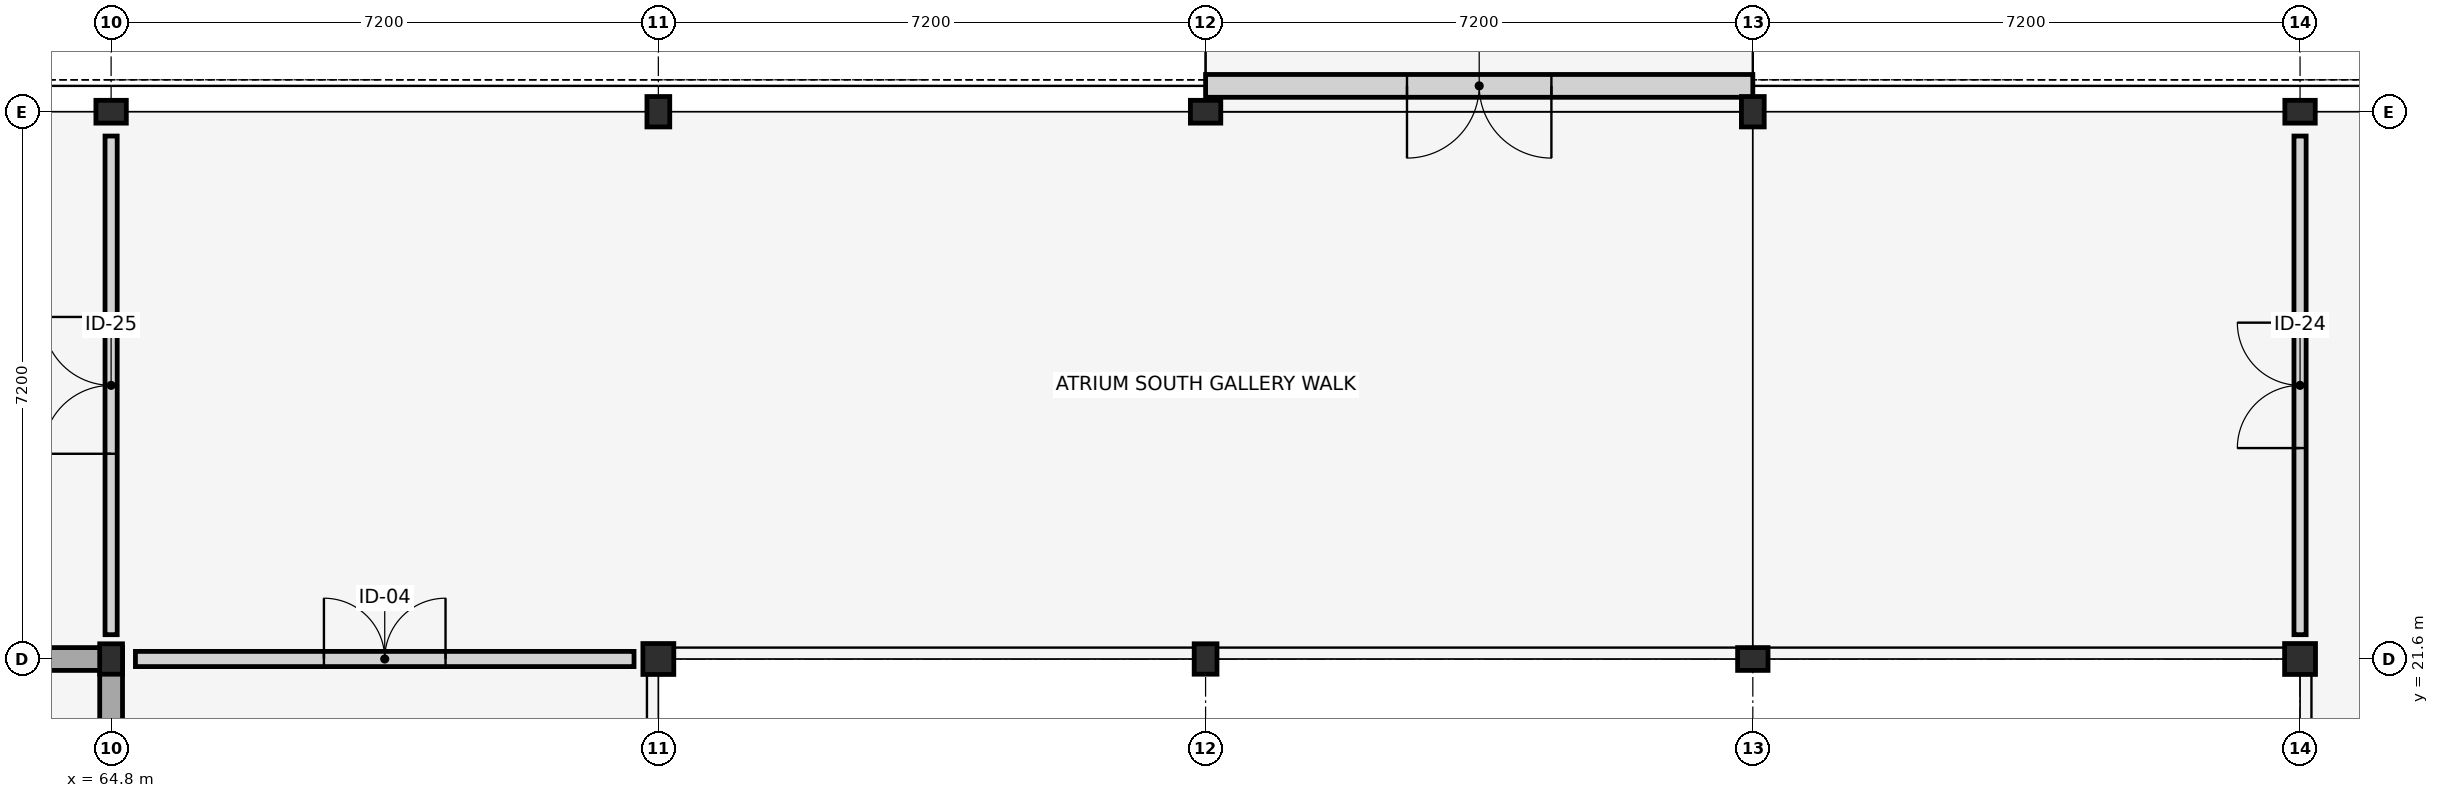
"""IFC4 building model, lengths in metres.
Left out: names, types, materials, properties, quantities, classifications, styles, units other than length and angle.
Written with IfcOpenShell. Run it as: python <this file> out.ifc"""

import sys

from ifc_helpers import new_model, si_unit, direction, frame, frame_2d, origin, origin_2d, place, context, subcontext, project, spatial, rectangle, hollow_circle, i_section, extrude, element, fill, save


model = new_model("IFC4")
c1 = context("Model", 3, precision=1e-05, world=origin(), true_north=direction((0.0, 1.0)))
c2 = subcontext(c1, "Body", "Model", "MODEL_VIEW")
j1 = project(units=[si_unit("LENGTHUNIT", "METRE"), si_unit("PLANEANGLEUNIT", "RADIAN")], contexts=[c1])
p1 = place(None, origin())
s1 = spatial("IfcSite", under=j1, at=p1, CompositionType="ELEMENT")
p2 = place(p1, origin())
s2 = spatial("IfcBuilding", under=s1, at=p2, CompositionType="ELEMENT")
p3 = place(p2, frame((0.0, 0.0, 4.5)))
s3 = spatial("IfcBuildingStorey", under=s2, at=p3, CompositionType="ELEMENT", Elevation=4.5)
for number, where, z_axis, x_axis in (
    (1, (64.8, 21.6, 0.0), (0.0, 0.0, 1.0), (1.0, 0.0, 0.0)),
    (2, (64.8, 28.8, 0.0), (0.0, 0.0, 1.0), (0.0, 1.0, 0.0)),
):
    element("IfcColumn", number, at=place(p3, frame(where, z_axis=z_axis, x_axis=x_axis)), inside=s3, PredefinedType="COLUMN", context=c2, shape_type="SweptSolid", body=[
        extrude(i_section(OverallWidth=0.3, OverallDepth=0.4, WebThickness=0.013, FlangeThickness=0.024, FilletRadius=0.027, at=origin_2d()), origin(), (0.0, 0.0, 1.0), 4.2),
    ])
p4 = place(p3, frame((72.0, 21.6, 0.0), z_axis=(0.0, 0.0, 1.0), x_axis=(0.0, 1.0, 0.0)))
e3 = element("IfcColumn", 3, at=p4, inside=s3, PredefinedType="COLUMN", context=c2, shape_type="SweptSolid", body=[
    extrude(hollow_circle(Radius=0.203, WallThickness=0.016, at=origin_2d()), origin(), (0.0, 0.0, 1.0), 4.2),
])
for number, where, z_axis, x_axis in (
    (4, (72.0, 28.8, 0.0), (0.0, 0.0, 1.0), (1.0, 0.0, 0.0)),
    (5, (79.2, 21.6, 0.0), (0.0, 0.0, 1.0), (1.0, 0.0, 0.0)),
    (6, (79.2, 28.8, 0.0), (0.0, 0.0, 1.0), (0.0, 1.0, 0.0)),
    (7, (86.4, 21.6, 0.0), (0.0, 0.0, 1.0), (0.0, 1.0, 0.0)),
    (8, (86.4, 28.8, 0.0), (0.0, 0.0, 1.0), (1.0, 0.0, 0.0)),
):
    element("IfcColumn", number, at=place(p3, frame(where, z_axis=z_axis, x_axis=x_axis)), inside=s3, PredefinedType="COLUMN", context=c2, shape_type="SweptSolid", body=[
        extrude(i_section(OverallWidth=0.3, OverallDepth=0.4, WebThickness=0.013, FlangeThickness=0.024, FilletRadius=0.027, at=origin_2d()), origin(), (0.0, 0.0, 1.0), 4.2),
    ])
p5 = place(p3, frame((93.6, 21.6, 0.0), z_axis=(0.0, 0.0, 1.0), x_axis=(1.0, 0.0, 0.0)))
e9 = element("IfcColumn", 9, at=p5, inside=s3, PredefinedType="COLUMN", context=c2, shape_type="SweptSolid", body=[
    extrude(hollow_circle(Radius=0.203, WallThickness=0.016, at=origin_2d()), origin(), (0.0, 0.0, 1.0), 4.2),
])
p6 = place(p3, frame((93.6, 28.8, 0.0), z_axis=(0.0, 0.0, 1.0), x_axis=(0.0, 1.0, 0.0)))
e10 = element("IfcColumn", 10, at=p6, inside=s3, PredefinedType="COLUMN", context=c2, shape_type="SweptSolid", body=[
    extrude(i_section(OverallWidth=0.3, OverallDepth=0.4, WebThickness=0.013, FlangeThickness=0.024, FilletRadius=0.027, at=origin_2d()), origin(), (0.0, 0.0, 1.0), 4.2),
])
p7 = place(p3, frame((86.4, 29.14, 0.0), z_axis=(0.0, 0.0, 1.0), x_axis=(-1.0, 0.0, 0.0)))
e11 = element("IfcWall", 11, at=p7, inside=s3, PredefinedType="STANDARD", context=c2, shape_type="SweptSolid", body=[
    extrude(rectangle(XDim=7.2, YDim=0.3, at=frame_2d((3.6, 0.0))), origin(), (0.0, 0.0, 1.0), 3.65),
])
p8 = place(p7, frame((2.65, 0.0, 0.0)))
e12 = element("IfcOpeningElement", 12, at=p8, cuts=e11, PredefinedType="OPENING", context=c2, shape_type="SweptSolid", body=[
    extrude(rectangle(XDim=1.9, YDim=2.45, at=frame_2d((0.95, 1.225))), frame((0.0, 0.16, 0.0), z_axis=(0.0, -1.0, 0.0), x_axis=(1.0, 0.0, 0.0)), (0.0, 0.0, 1.0), 0.32),
])
p9 = place(p3, frame((57.6, 21.6, 0.0), z_axis=(0.0, 0.0, 1.0), x_axis=(1.0, 0.0, 0.0)))
e13 = element("IfcWall", 13, at=p9, inside=s3, PredefinedType="SHEAR", context=c2, shape_type="SweptSolid", body=[
    extrude(rectangle(XDim=7.35, YDim=0.3, at=frame_2d((3.675, 0.0))), origin(), (0.0, 0.0, 1.0), 3.98),
])
p10 = place(p3, frame((64.8, 7.35, 0.0), z_axis=(0.0, 0.0, 1.0), x_axis=(0.0, 1.0, 0.0)))
e14 = element("IfcWall", 14, at=p10, inside=s3, PredefinedType="SHEAR", context=c2, shape_type="SweptSolid", body=[
    extrude(rectangle(XDim=14.1, YDim=0.3, at=frame_2d((7.05, 0.0))), origin(), (0.0, 0.0, 1.0), 3.98),
])
p11 = place(p10, frame((3.55, 0.0, 0.0)))
e15 = element("IfcOpeningElement", 15, at=p11, cuts=e14, PredefinedType="OPENING", context=c2, shape_type="SweptSolid", body=[
    extrude(rectangle(XDim=1.3, YDim=2.2, at=frame_2d((0.65, 1.1))), frame((0.0, 0.16, 0.0), z_axis=(0.0, -1.0, 0.0), x_axis=(1.0, 0.0, 0.0)), (0.0, 0.0, 1.0), 0.32),
])
p12 = place(p10, frame((7.85, 0.0, 0.0)))
e16 = element("IfcOpeningElement", 16, at=p12, cuts=e14, PredefinedType="OPENING", context=c2, shape_type="SweptSolid", body=[
    extrude(rectangle(XDim=1.05, YDim=2.15, at=frame_2d((0.525, 1.075))), frame((0.0, 0.16, 0.0), z_axis=(0.0, -1.0, 0.0), x_axis=(1.0, 0.0, 0.0)), (0.0, 0.0, 1.0), 0.32),
])
p13 = place(p10, frame((10.55, 0.0, 0.0)))
e17 = element("IfcOpeningElement", 17, at=p13, cuts=e14, PredefinedType="OPENING", context=c2, shape_type="SweptSolid", body=[
    extrude(rectangle(XDim=1.0, YDim=2.15, at=frame_2d((0.5, 1.075))), frame((0.0, 0.16, 0.0), z_axis=(0.0, -1.0, 0.0), x_axis=(1.0, 0.0, 0.0)), (0.0, 0.0, 1.0), 0.32),
])
p14 = place(p3, frame((65.12, 21.6, 0.0), z_axis=(0.0, 0.0, 1.0), x_axis=(1.0, 0.0, 0.0)))
e18 = element("IfcWall", 18, at=p14, inside=s3, PredefinedType="PARTITIONING", context=c2, shape_type="SweptSolid", body=[
    extrude(rectangle(XDim=6.56, YDim=0.2, at=frame_2d((3.28, 0.0))), origin(), (0.0, 0.0, 1.0), 3.15),
])
p15 = place(p14, frame((2.48, 0.0, 0.0)))
e19 = element("IfcOpeningElement", 19, at=p15, cuts=e18, PredefinedType="OPENING", context=c2, shape_type="SweptSolid", body=[
    extrude(rectangle(XDim=1.6, YDim=2.35, at=frame_2d((0.8, 1.175))), frame((0.0, 0.11, 0.0), z_axis=(0.0, -1.0, 0.0), x_axis=(1.0, 0.0, 0.0)), (0.0, 0.0, 1.0), 0.22),
])
p16 = place(p3, frame((93.6, 21.92, 0.0), z_axis=(0.0, 0.0, 1.0), x_axis=(0.0, 1.0, 0.0)))
e20 = element("IfcWall", 20, at=p16, inside=s3, PredefinedType="PARTITIONING", context=c2, shape_type="SweptSolid", body=[
    extrude(rectangle(XDim=6.56, YDim=0.16, at=frame_2d((3.28, 0.0))), origin(), (0.0, 0.0, 1.0), 3.15),
])
p17 = place(p16, frame((2.455, 0.0, 0.0)))
e21 = element("IfcOpeningElement", 21, at=p17, cuts=e20, PredefinedType="OPENING", context=c2, shape_type="SweptSolid", body=[
    extrude(rectangle(XDim=1.65, YDim=2.45, at=frame_2d((0.825, 1.225))), frame((0.0, 0.09, 0.0), z_axis=(0.0, -1.0, 0.0), x_axis=(1.0, 0.0, 0.0)), (0.0, 0.0, 1.0), 0.18),
])
p18 = place(p3, frame((64.8, 21.92, 0.0), z_axis=(0.0, 0.0, 1.0), x_axis=(0.0, 1.0, 0.0)))
e22 = element("IfcWall", 22, at=p18, inside=s3, PredefinedType="PARTITIONING", context=c2, shape_type="SweptSolid", body=[
    extrude(rectangle(XDim=6.56, YDim=0.16, at=frame_2d((3.28, 0.0))), origin(), (0.0, 0.0, 1.0), 3.15),
])
p19 = place(p18, frame((2.38, 0.0, 0.0)))
e23 = element("IfcOpeningElement", 23, at=p19, cuts=e22, PredefinedType="OPENING", context=c2, shape_type="SweptSolid", body=[
    extrude(rectangle(XDim=1.8, YDim=2.55, at=frame_2d((0.9, 1.275))), frame((0.0, 0.09, 0.0), z_axis=(0.0, -1.0, 0.0), x_axis=(1.0, 0.0, 0.0)), (0.0, 0.0, 1.0), 0.18),
])
p20 = place(p8, origin())
e24 = element("IfcDoor", 24, at=p20, inside=s3, OperationType="DOUBLE_DOOR_SINGLE_SWING", PredefinedType="DOOR", context=c2, shape_type="SweptSolid", body=[
    extrude(rectangle(XDim=1.9, YDim=2.45, at=frame_2d((0.95, 1.225))), frame((0.0, 0.025, 0.0), z_axis=(0.0, -1.0, 0.0), x_axis=(1.0, 0.0, 0.0)), (0.0, 0.0, 1.0), 0.05),
])
fill(e12, e24)
p21 = place(p15, origin())
e25 = element("IfcDoor", 25, at=p21, inside=s3, OperationType="DOUBLE_DOOR_SINGLE_SWING", PredefinedType="DOOR", context=c2, shape_type="SweptSolid", body=[
    extrude(rectangle(XDim=1.6, YDim=2.35, at=frame_2d((0.8, 1.175))), frame((0.0, 0.025, 0.0), z_axis=(0.0, -1.0, 0.0), x_axis=(1.0, 0.0, 0.0)), (0.0, 0.0, 1.0), 0.05),
])
fill(e19, e25)
p22 = place(p17, origin())
e26 = element("IfcDoor", 26, at=p22, inside=s3, OperationType="DOUBLE_DOOR_SINGLE_SWING", PredefinedType="DOOR", context=c2, shape_type="SweptSolid", body=[
    extrude(rectangle(XDim=1.65, YDim=2.45, at=frame_2d((0.825, 1.225))), frame((0.0, 0.025, 0.0), z_axis=(0.0, -1.0, 0.0), x_axis=(1.0, 0.0, 0.0)), (0.0, 0.0, 1.0), 0.05),
])
fill(e21, e26)
p23 = place(p19, origin())
e27 = element("IfcDoor", 27, at=p23, inside=s3, OperationType="DOUBLE_DOOR_SINGLE_SWING", PredefinedType="DOOR", context=c2, shape_type="SweptSolid", body=[
    extrude(rectangle(XDim=1.8, YDim=2.55, at=frame_2d((0.9, 1.275))), frame((0.0, 0.025, 0.0), z_axis=(0.0, -1.0, 0.0), x_axis=(1.0, 0.0, 0.0)), (0.0, 0.0, 1.0), 0.05),
])
fill(e23, e27)
save(model, sys.argv[1])
